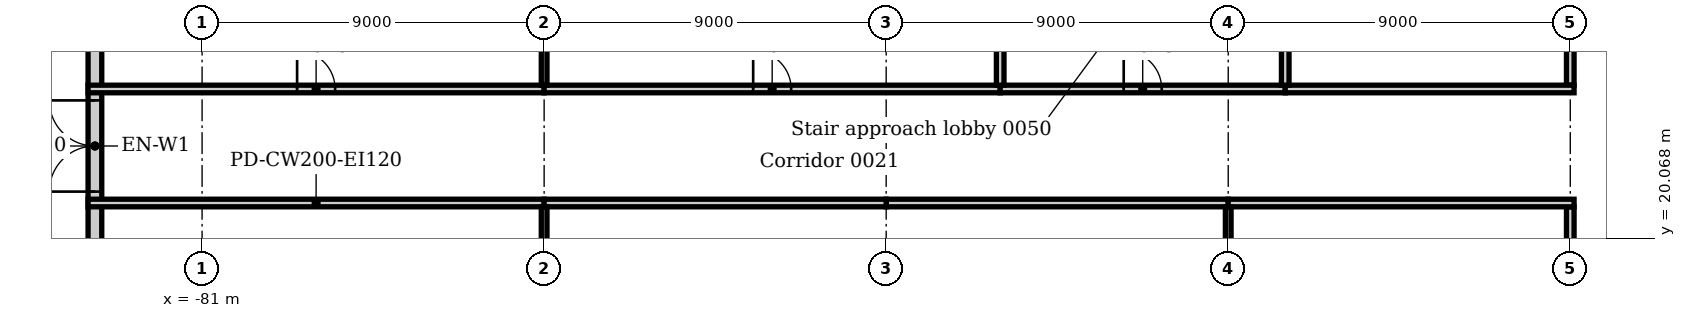
"""IFC4 building model, lengths in metres.
Left out: names, types, materials, properties, quantities, classifications, styles, units other than length and angle.
Written with IfcOpenShell. Run it as: python <this file> out.ifc"""

import sys

from ifc_helpers import new_model, si_unit, direction, frame, frame_2d, origin, place, context, subcontext, project, spatial, rectangle, extrude, element, fill, save


model = new_model("IFC4")
c1 = context("Model", 3, precision=1e-05, world=origin(), true_north=direction((0.0, 1.0)))
c2 = subcontext(c1, "Body", "Model", "MODEL_VIEW")
j1 = project(units=[si_unit("LENGTHUNIT", "METRE"), si_unit("PLANEANGLEUNIT", "RADIAN")], contexts=[c1])
p1 = place(None, origin())
s1 = spatial("IfcSite", under=j1, at=p1, CompositionType="ELEMENT")
p2 = place(p1, origin())
s2 = spatial("IfcBuilding", under=s1, at=p2, CompositionType="ELEMENT")
p3 = place(p2, origin())
s3 = spatial("IfcBuildingStorey", under=s2, at=p3, CompositionType="ELEMENT", Elevation=0.0)
p4 = place(p3, frame((-83.82, 54.0, 0.0), z_axis=(0.0, 0.0, 1.0), x_axis=(0.0, -1.0, 0.0)))
e1 = element("IfcWall", 1, at=p4, inside=s3, PredefinedType="STANDARD", context=c2, shape_type="SweptSolid", body=[
    extrude(rectangle(XDim=63.0, YDim=0.36, at=frame_2d((31.5, 0.0))), origin(), (0.0, 0.0, 1.0), 5.7),
])
p5 = place(p4, frame((41.4, 0.0, 0.0)))
e2 = element("IfcOpeningElement", 2, at=p5, cuts=e1, PredefinedType="OPENING", context=c2, shape_type="SweptSolid", body=[
    extrude(rectangle(XDim=1.2, YDim=2.2, at=frame_2d((0.6, 1.1))), frame((0.0, 0.19, 0.0), z_axis=(0.0, -1.0, 0.0), x_axis=(1.0, 0.0, 0.0)), (0.0, 0.0, 1.0), 0.38),
])
p6 = place(p4, frame((30.3, 0.0, 0.0)))
e3 = element("IfcOpeningElement", 3, at=p6, cuts=e1, PredefinedType="OPENING", context=c2, shape_type="SweptSolid", body=[
    extrude(rectangle(XDim=2.4, YDim=2.2, at=frame_2d((1.2, 1.1))), frame((0.0, 0.19, 0.0), z_axis=(0.0, -1.0, 0.0), x_axis=(1.0, 0.0, 0.0)), (0.0, 0.0, 1.0), 0.38),
])
p7 = place(p4, frame((11.85, 0.0, 0.6)))
e4 = element("IfcOpeningElement", 4, at=p7, cuts=e1, PredefinedType="OPENING", context=c2, shape_type="SweptSolid", body=[
    extrude(rectangle(XDim=3.3, YDim=3.0, at=frame_2d((1.65, 1.5))), frame((0.0, 0.19, 0.0), z_axis=(0.0, -1.0, 0.0), x_axis=(1.0, 0.0, 0.0)), (0.0, 0.0, 1.0), 0.38),
])
p8 = place(p4, frame((16.35, 0.0, 0.6)))
e5 = element("IfcOpeningElement", 5, at=p8, cuts=e1, PredefinedType="OPENING", context=c2, shape_type="SweptSolid", body=[
    extrude(rectangle(XDim=3.3, YDim=3.0, at=frame_2d((1.65, 1.5))), frame((0.0, 0.19, 0.0), z_axis=(0.0, -1.0, 0.0), x_axis=(1.0, 0.0, 0.0)), (0.0, 0.0, 1.0), 0.38),
])
p9 = place(p4, frame((20.85, 0.0, 0.6)))
e6 = element("IfcOpeningElement", 6, at=p9, cuts=e1, PredefinedType="OPENING", context=c2, shape_type="SweptSolid", body=[
    extrude(rectangle(XDim=3.3, YDim=3.0, at=frame_2d((1.65, 1.5))), frame((0.0, 0.19, 0.0), z_axis=(0.0, -1.0, 0.0), x_axis=(1.0, 0.0, 0.0)), (0.0, 0.0, 1.0), 0.38),
])
p10 = place(p4, frame((25.35, 0.0, 0.6)))
e7 = element("IfcOpeningElement", 7, at=p10, cuts=e1, PredefinedType="OPENING", context=c2, shape_type="SweptSolid", body=[
    extrude(rectangle(XDim=3.3, YDim=3.0, at=frame_2d((1.65, 1.5))), frame((0.0, 0.19, 0.0), z_axis=(0.0, -1.0, 0.0), x_axis=(1.0, 0.0, 0.0)), (0.0, 0.0, 1.0), 0.38),
])
p11 = place(p4, frame((34.35, 0.0, 0.6)))
e8 = element("IfcOpeningElement", 8, at=p11, cuts=e1, PredefinedType="OPENING", context=c2, shape_type="SweptSolid", body=[
    extrude(rectangle(XDim=3.3, YDim=3.0, at=frame_2d((1.65, 1.5))), frame((0.0, 0.19, 0.0), z_axis=(0.0, -1.0, 0.0), x_axis=(1.0, 0.0, 0.0)), (0.0, 0.0, 1.0), 0.38),
])
p12 = place(p4, frame((43.35, 0.0, 0.6)))
e9 = element("IfcOpeningElement", 9, at=p12, cuts=e1, PredefinedType="OPENING", context=c2, shape_type="SweptSolid", body=[
    extrude(rectangle(XDim=3.3, YDim=3.0, at=frame_2d((1.65, 1.5))), frame((0.0, 0.19, 0.0), z_axis=(0.0, -1.0, 0.0), x_axis=(1.0, 0.0, 0.0)), (0.0, 0.0, 1.0), 0.38),
])
p13 = place(p4, frame((47.85, 0.0, 0.6)))
e10 = element("IfcOpeningElement", 10, at=p13, cuts=e1, PredefinedType="OPENING", context=c2, shape_type="SweptSolid", body=[
    extrude(rectangle(XDim=3.3, YDim=3.0, at=frame_2d((1.65, 1.5))), frame((0.0, 0.19, 0.0), z_axis=(0.0, -1.0, 0.0), x_axis=(1.0, 0.0, 0.0)), (0.0, 0.0, 1.0), 0.38),
])
p14 = place(p4, frame((52.35, 0.0, 0.6)))
e11 = element("IfcOpeningElement", 11, at=p14, cuts=e1, PredefinedType="OPENING", context=c2, shape_type="SweptSolid", body=[
    extrude(rectangle(XDim=3.3, YDim=3.0, at=frame_2d((1.65, 1.5))), frame((0.0, 0.19, 0.0), z_axis=(0.0, -1.0, 0.0), x_axis=(1.0, 0.0, 0.0)), (0.0, 0.0, 1.0), 0.38),
])
p15 = place(p4, frame((56.85, 0.0, 0.6)))
e12 = element("IfcOpeningElement", 12, at=p15, cuts=e1, PredefinedType="OPENING", context=c2, shape_type="SweptSolid", body=[
    extrude(rectangle(XDim=3.3, YDim=3.0, at=frame_2d((1.65, 1.5))), frame((0.0, 0.19, 0.0), z_axis=(0.0, -1.0, 0.0), x_axis=(1.0, 0.0, 0.0)), (0.0, 0.0, 1.0), 0.38),
])
for number, where, z_axis, x_axis in (
    (13, (-45.0, 18.42, 0.0), (0.0, 0.0, 1.0), (0.0, 1.0, 0.0)),
    (14, (-45.0, 24.1, 0.0), (0.0, 0.0, 1.0), (0.0, 1.0, 0.0)),
):
    element("IfcWall", number, at=place(p3, frame(where, z_axis=z_axis, x_axis=x_axis)), inside=s3, PredefinedType="PARTITIONING", context=c2, shape_type="SweptSolid", body=[
        extrude(rectangle(XDim=2.48, YDim=0.2, at=frame_2d((1.24, 0.0))), origin(), (0.0, 0.0, 1.0), 5.7),
    ])
p16 = place(p3, frame((-84.0, 21.0, 0.0), z_axis=(0.0, 0.0, 1.0), x_axis=(1.0, 0.0, 0.0)))
e15 = element("IfcWall", 15, at=p16, inside=s3, PredefinedType="PARTITIONING", context=c2, shape_type="SweptSolid", body=[
    extrude(rectangle(XDim=12.0, YDim=0.2, at=frame_2d((6.0, 0.0))), origin(), (0.0, 0.0, 1.0), 5.7),
])
for number, where, z_axis, x_axis in (
    (16, (-63.0, 21.0, 0.0), (0.0, 0.0, 1.0), (1.0, 0.0, 0.0)),
    (17, (-72.0, 21.0, 0.0), (0.0, 0.0, 1.0), (1.0, 0.0, 0.0)),
):
    element("IfcWall", number, at=place(p3, frame(where, z_axis=z_axis, x_axis=x_axis)), inside=s3, PredefinedType="PARTITIONING", context=c2, shape_type="SweptSolid", body=[
        extrude(rectangle(XDim=9.0, YDim=0.2, at=frame_2d((4.5, 0.0))), origin(), (0.0, 0.0, 1.0), 5.7),
    ])
p17 = place(p3, frame((-54.0, 21.0, 0.0), z_axis=(0.0, 0.0, 1.0), x_axis=(1.0, 0.0, 0.0)))
e18 = element("IfcWall", 18, at=p17, inside=s3, PredefinedType="PARTITIONING", context=c2, shape_type="SweptSolid", body=[
    extrude(rectangle(XDim=9.1, YDim=0.2, at=frame_2d((4.55, 0.0))), origin(), (0.0, 0.0, 1.0), 5.7),
])
p18 = place(p3, frame((-84.0, 24.0, 0.0), z_axis=(0.0, 0.0, 1.0), x_axis=(1.0, 0.0, 0.0)))
e19 = element("IfcWall", 19, at=p18, inside=s3, PredefinedType="PARTITIONING", context=c2, shape_type="SweptSolid", body=[
    extrude(rectangle(XDim=12.0, YDim=0.2, at=frame_2d((6.0, 0.0))), origin(), (0.0, 0.0, 1.0), 5.7),
])
p19 = place(p18, frame((5.5, 0.0, 0.0)))
e20 = element("IfcOpeningElement", 20, at=p19, cuts=e19, PredefinedType="OPENING", context=c2, shape_type="SweptSolid", body=[
    extrude(rectangle(XDim=1.0, YDim=2.1, at=frame_2d((0.5, 1.05))), frame((0.0, 0.11, 0.0), z_axis=(0.0, -1.0, 0.0), x_axis=(1.0, 0.0, 0.0)), (0.0, 0.0, 1.0), 0.22),
])
p20 = place(p3, frame((-72.0, 24.0, 0.0), z_axis=(0.0, 0.0, 1.0), x_axis=(1.0, 0.0, 0.0)))
e21 = element("IfcWall", 21, at=p20, inside=s3, PredefinedType="PARTITIONING", context=c2, shape_type="SweptSolid", body=[
    extrude(rectangle(XDim=12.0, YDim=0.2, at=frame_2d((6.0, 0.0))), origin(), (0.0, 0.0, 1.0), 5.7),
])
p21 = place(p20, frame((5.5, 0.0, 0.0)))
e22 = element("IfcOpeningElement", 22, at=p21, cuts=e21, PredefinedType="OPENING", context=c2, shape_type="SweptSolid", body=[
    extrude(rectangle(XDim=1.0, YDim=2.1, at=frame_2d((0.5, 1.05))), frame((0.0, 0.11, 0.0), z_axis=(0.0, -1.0, 0.0), x_axis=(1.0, 0.0, 0.0)), (0.0, 0.0, 1.0), 0.22),
])
p22 = place(p3, frame((-60.0, 24.0, 0.0), z_axis=(0.0, 0.0, 1.0), x_axis=(1.0, 0.0, 0.0)))
e23 = element("IfcWall", 23, at=p22, inside=s3, PredefinedType="PARTITIONING", context=c2, shape_type="SweptSolid", body=[
    extrude(rectangle(XDim=7.5, YDim=0.2, at=frame_2d((3.75, 0.0))), origin(), (0.0, 0.0, 1.0), 5.7),
])
p23 = place(p22, frame((3.25, 0.0, 0.0)))
e24 = element("IfcOpeningElement", 24, at=p23, cuts=e23, PredefinedType="OPENING", context=c2, shape_type="SweptSolid", body=[
    extrude(rectangle(XDim=1.0, YDim=2.1, at=frame_2d((0.5, 1.05))), frame((0.0, 0.11, 0.0), z_axis=(0.0, -1.0, 0.0), x_axis=(1.0, 0.0, 0.0)), (0.0, 0.0, 1.0), 0.22),
])
p24 = place(p3, frame((-52.5, 24.0, 0.0), z_axis=(0.0, 0.0, 1.0), x_axis=(1.0, 0.0, 0.0)))
e25 = element("IfcWall", 25, at=p24, inside=s3, PredefinedType="PARTITIONING", context=c2, shape_type="SweptSolid", body=[
    extrude(rectangle(XDim=7.6, YDim=0.2, at=frame_2d((3.8, 0.0))), origin(), (0.0, 0.0, 1.0), 5.7),
])
p25 = place(p3, frame((-72.0, 3.7, 0.0), z_axis=(0.0, 0.0, 1.0), x_axis=(0.0, 1.0, 0.0)))
e26 = element("IfcWall", 26, at=p25, inside=s3, PredefinedType="PARTITIONING", context=c2, shape_type="SweptSolid", body=[
    extrude(rectangle(XDim=17.2, YDim=0.15, at=frame_2d((8.6, 0.0))), origin(), (0.0, 0.0, 1.0), 5.7),
])
p26 = place(p3, frame((-54.0, 18.42, 0.0), z_axis=(0.0, 0.0, 1.0), x_axis=(0.0, 1.0, 0.0)))
e27 = element("IfcWall", 27, at=p26, inside=s3, PredefinedType="PARTITIONING", context=c2, shape_type="SweptSolid", body=[
    extrude(rectangle(XDim=2.48, YDim=0.15, at=frame_2d((1.24, 0.0))), origin(), (0.0, 0.0, 1.0), 5.7),
])
p27 = place(p3, frame((-72.0, 24.1, 0.0), z_axis=(0.0, 0.0, 1.0), x_axis=(0.0, 1.0, 0.0)))
e28 = element("IfcWall", 28, at=p27, inside=s3, PredefinedType="PARTITIONING", context=c2, shape_type="SweptSolid", body=[
    extrude(rectangle(XDim=14.9, YDim=0.15, at=frame_2d((7.45, 0.0))), origin(), (0.0, 0.0, 1.0), 5.7),
])
for number, where, z_axis, x_axis in (
    (29, (-60.0, 24.1, 0.0), (0.0, 0.0, 1.0), (0.0, 1.0, 0.0)),
    (30, (-52.5, 24.1, 0.0), (0.0, 0.0, 1.0), (0.0, 1.0, 0.0)),
):
    element("IfcWall", number, at=place(p3, frame(where, z_axis=z_axis, x_axis=x_axis)), inside=s3, PredefinedType="PARTITIONING", context=c2, shape_type="SweptSolid", body=[
        extrude(rectangle(XDim=5.15, YDim=0.2, at=frame_2d((2.575, 0.0))), origin(), (0.0, 0.0, 1.0), 5.7),
    ])
p28 = place(p6, frame((2.4, 0.0, 0.0), z_axis=(0.0, 0.0, 1.0), x_axis=(-1.0, 0.0, 0.0)))
e31 = element("IfcDoor", 31, at=p28, inside=s3, OperationType="DOUBLE_DOOR_SINGLE_SWING", PredefinedType="DOOR", context=c2, shape_type="SweptSolid", body=[
    extrude(rectangle(XDim=2.4, YDim=2.2, at=frame_2d((1.2, 1.1))), frame((0.0, -0.07, 0.0), z_axis=(0.0, -1.0, 0.0), x_axis=(1.0, 0.0, 0.0)), (0.0, 0.0, 1.0), 0.05),
])
fill(e3, e31)
p29 = place(p19, origin())
e32 = element("IfcDoor", 32, at=p29, inside=s3, OperationType="SINGLE_SWING_LEFT", PredefinedType="DOOR", context=c2, shape_type="SweptSolid", body=[
    extrude(rectangle(XDim=1.0, YDim=2.1, at=frame_2d((0.5, 1.05))), frame((0.0, 0.025, 0.0), z_axis=(0.0, -1.0, 0.0), x_axis=(1.0, 0.0, 0.0)), (0.0, 0.0, 1.0), 0.05),
])
fill(e20, e32)
p30 = place(p21, origin())
e33 = element("IfcDoor", 33, at=p30, inside=s3, OperationType="SINGLE_SWING_LEFT", PredefinedType="DOOR", context=c2, shape_type="SweptSolid", body=[
    extrude(rectangle(XDim=1.0, YDim=2.1, at=frame_2d((0.5, 1.05))), frame((0.0, 0.025, 0.0), z_axis=(0.0, -1.0, 0.0), x_axis=(1.0, 0.0, 0.0)), (0.0, 0.0, 1.0), 0.05),
])
fill(e22, e33)
p31 = place(p23, origin())
e34 = element("IfcDoor", 34, at=p31, inside=s3, OperationType="SINGLE_SWING_LEFT", PredefinedType="DOOR", context=c2, shape_type="SweptSolid", body=[
    extrude(rectangle(XDim=1.0, YDim=2.1, at=frame_2d((0.5, 1.05))), frame((0.0, 0.025, 0.0), z_axis=(0.0, -1.0, 0.0), x_axis=(1.0, 0.0, 0.0)), (0.0, 0.0, 1.0), 0.05),
])
fill(e24, e34)
save(model, sys.argv[1])
